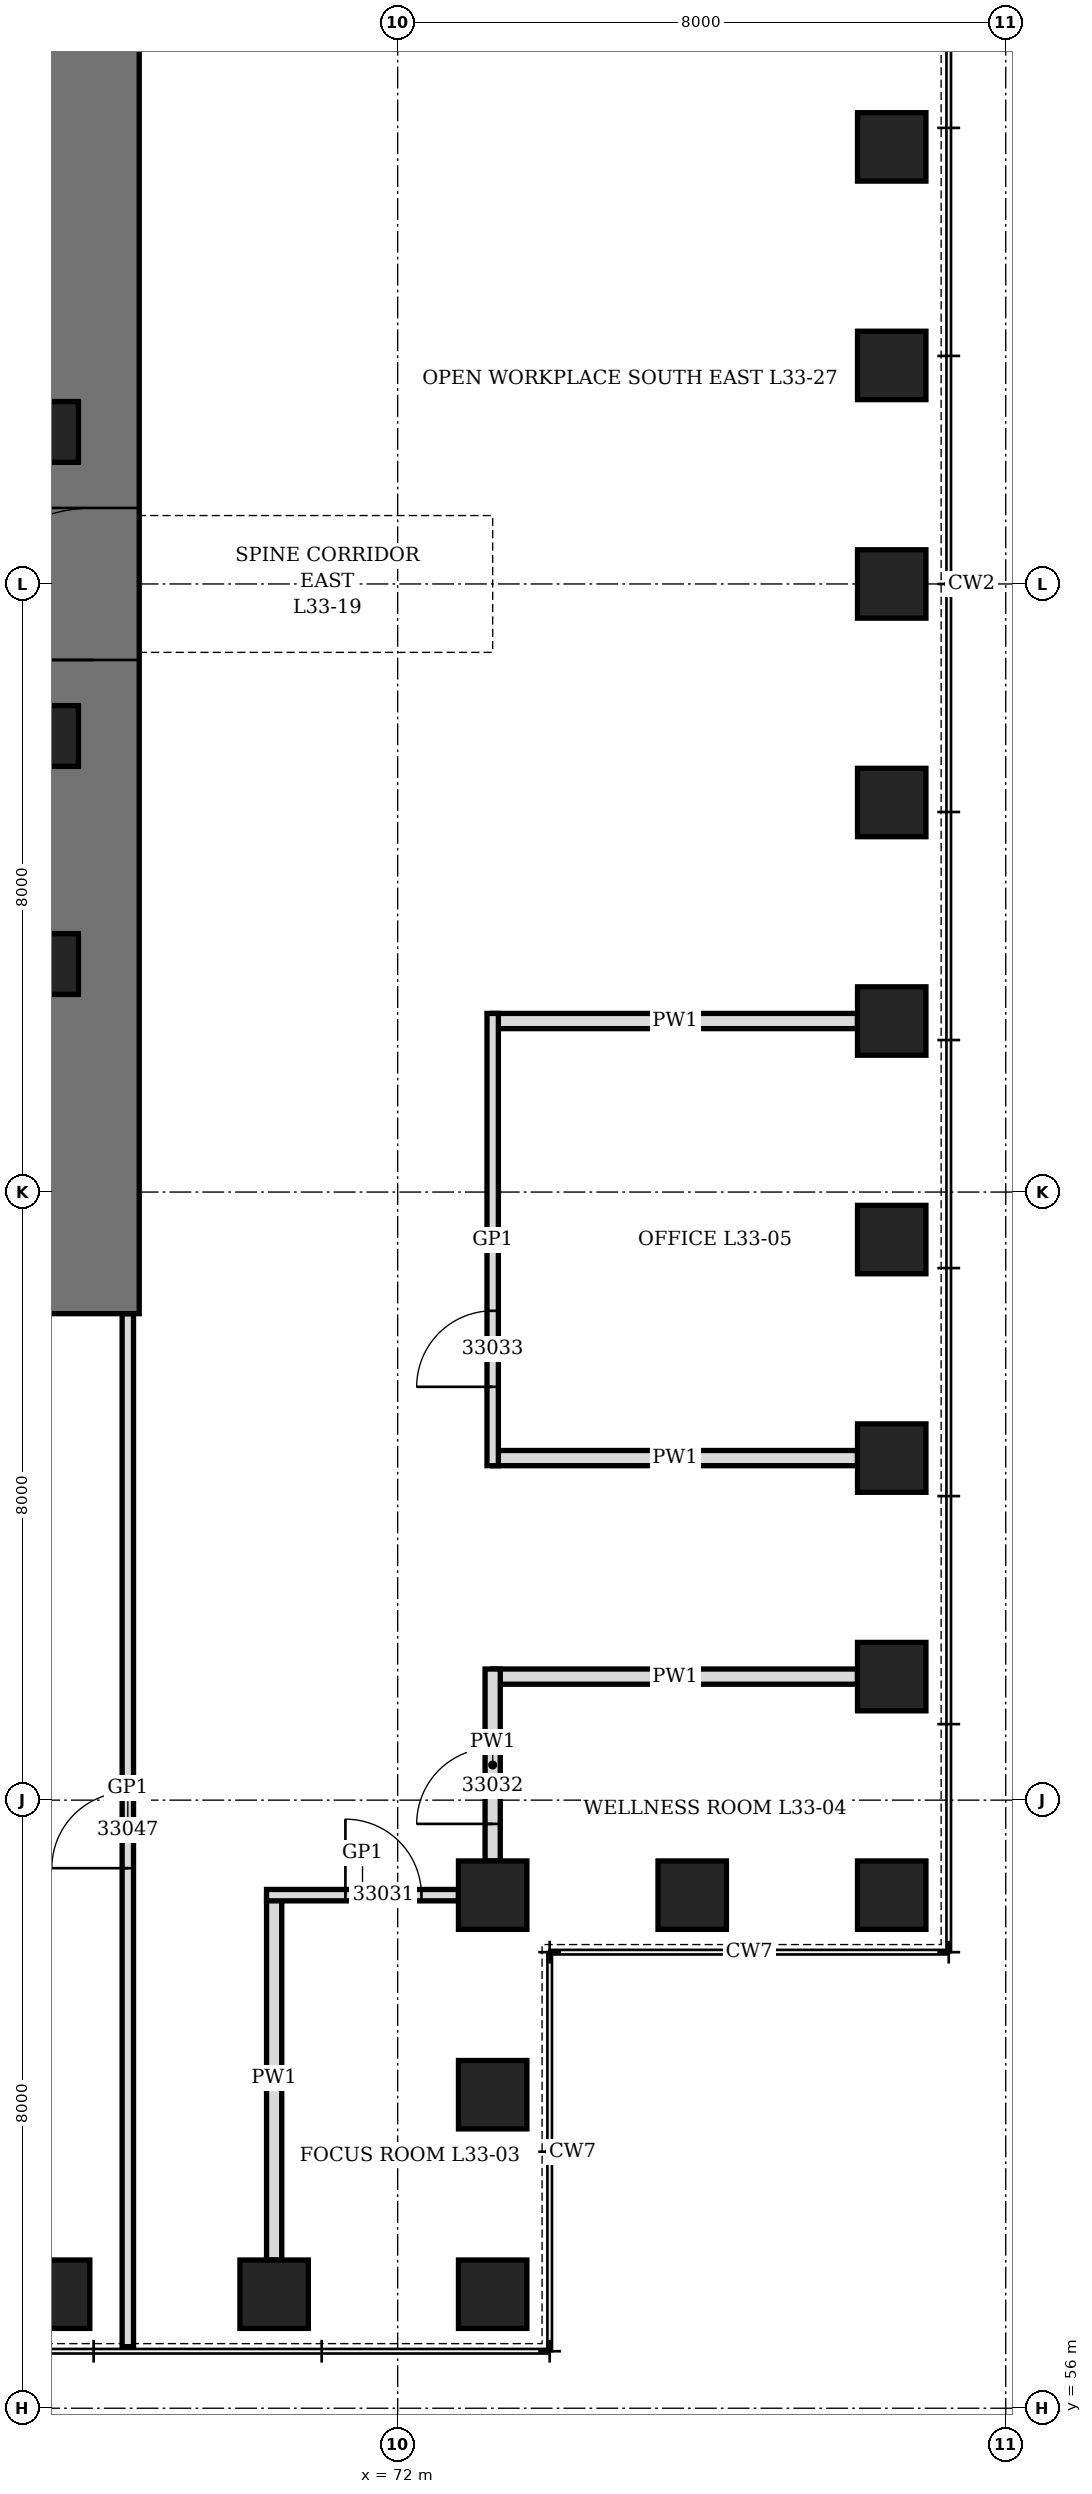
"""IFC4 building model, lengths in metres.
Left out: names, types, materials, properties, quantities, classifications, styles, units other than length and angle.
Written with IfcOpenShell. Run it as: python <this file> out.ifc"""

import sys

from ifc_helpers import new_model, si_unit, direction, frame, frame_2d, origin, origin_2d, place, context, subcontext, project, spatial, rectangle, hollow_rectangle, extrude, element, fill, save


model = new_model("IFC4")
c1 = context("Model", 3, precision=1e-05, world=origin(), true_north=direction((0.0, 1.0)))
c2 = subcontext(c1, "Body", "Model", "MODEL_VIEW")
j1 = project(units=[si_unit("LENGTHUNIT", "METRE"), si_unit("PLANEANGLEUNIT", "RADIAN")], contexts=[c1])
p1 = place(None, origin())
s1 = spatial("IfcSite", under=j1, at=p1, CompositionType="ELEMENT")
p2 = place(p1, origin())
s2 = spatial("IfcBuilding", under=s1, at=p2, CompositionType="ELEMENT")
p3 = place(p2, frame((0.0, 0.0, 150.1)))
s3 = spatial("IfcBuildingStorey", under=s2, at=p3, CompositionType="ELEMENT", Elevation=150.1)
for number, where, z_axis, x_axis in (
    (1, (67.5, 57.5, 0.0), (0.0, 0.0, 1.0), (1.0, 0.0, 0.0)),
    (2, (70.375, 57.5, 0.0), (0.0, 0.0, 1.0), (1.0, 0.0, 0.0)),
    (3, (73.25, 57.5, 0.0), (0.0, 0.0, 1.0), (0.0, 1.0, 0.0)),
    (4, (73.25, 60.125, 0.0), (0.0, 0.0, 1.0), (0.0, 1.0, 0.0)),
    (5, (73.25, 62.75, 0.0), (0.0, 0.0, 1.0), (1.0, 0.0, 0.0)),
    (6, (75.875, 62.75, 0.0), (0.0, 0.0, 1.0), (1.0, 0.0, 0.0)),
    (7, (78.5, 62.75, 0.0), (0.0, 0.0, 1.0), (0.0, 1.0, 0.0)),
    (8, (78.5, 65.625, 0.0), (0.0, 0.0, 1.0), (0.0, 1.0, 0.0)),
    (9, (78.5, 68.5, 0.0), (0.0, 0.0, 1.0), (0.0, 1.0, 0.0)),
    (10, (78.5, 71.375, 0.0), (0.0, 0.0, 1.0), (0.0, 1.0, 0.0)),
    (11, (78.5, 74.25, 0.0), (0.0, 0.0, 1.0), (0.0, 1.0, 0.0)),
    (12, (78.5, 77.125, 0.0), (0.0, 0.0, 1.0), (0.0, 1.0, 0.0)),
    (13, (78.5, 80.0, 0.0), (0.0, 0.0, 1.0), (0.0, 1.0, 0.0)),
    (14, (78.5, 82.875, 0.0), (0.0, 0.0, 1.0), (0.0, 1.0, 0.0)),
    (15, (78.5, 85.75, 0.0), (0.0, 0.0, 1.0), (0.0, 1.0, 0.0)),
):
    element("IfcColumn", number, at=place(p3, frame(where, z_axis=z_axis, x_axis=x_axis)), inside=s3, PredefinedType="COLUMN", context=c2, shape_type="SweptSolid", body=[
        extrude(hollow_rectangle(XDim=0.9, YDim=0.9, WallThickness=0.12, at=origin_2d()), origin(), (0.0, 0.0, 1.0), 4.2),
    ])
p4 = place(p3, frame((68.0, 70.4, 0.0), z_axis=(0.0, 0.0, 1.0), x_axis=(0.0, 1.0, 0.0)))
e16 = element("IfcWall", 16, at=p4, inside=s3, PredefinedType="SHEAR", context=c2, shape_type="SweptSolid", body=[
    extrude(rectangle(XDim=19.2, YDim=1.2, at=frame_2d((9.6, 0.0))), origin(), (0.0, 0.0, 1.0), 4.2),
])
p5 = place(p4, frame((8.6, 0.0, 0.0)))
e17 = element("IfcOpeningElement", 17, at=p5, cuts=e16, PredefinedType="OPENING", context=c2, shape_type="SweptSolid", body=[
    extrude(rectangle(XDim=2.0, YDim=2.4, at=frame_2d((1.0, 1.2))), frame((0.0, 0.61, 0.0), z_axis=(0.0, -1.0, 0.0), x_axis=(1.0, 0.0, 0.0)), (0.0, 0.0, 1.0), 1.22),
])
for number, where, z_axis, x_axis in (
    (18, (67.4, 75.0, 0.0), (0.0, 0.0, 1.0), (1.0, 0.0, 0.0)),
    (19, (67.4, 78.0, 0.0), (0.0, 0.0, 1.0), (1.0, 0.0, 0.0)),
    (20, (67.4, 82.0, 0.0), (0.0, 0.0, 1.0), (1.0, 0.0, 0.0)),
):
    element("IfcColumn", number, at=place(p3, frame(where, z_axis=z_axis, x_axis=x_axis)), inside=s3, PredefinedType="COLUMN", context=c2, shape_type="SweptSolid", body=[
        extrude(hollow_rectangle(XDim=0.8, YDim=0.8, WallThickness=0.1, at=origin_2d()), origin(), (0.0, 0.0, 1.0), 4.2),
    ])
for number, where, z_axis, x_axis in (
    (21, (70.375, 57.95, 0.0), (0.0, 0.0, 1.0), (0.0, 1.0, 0.0)),
    (22, (73.25, 65.625, 0.0), (0.0, 0.0, 1.0), (1.0, 0.0, 0.0)),
    (23, (73.25, 68.5, 0.0), (0.0, 0.0, 1.0), (1.0, 0.0, 0.0)),
    (24, (73.25, 74.25, 0.0), (0.0, 0.0, 1.0), (1.0, 0.0, 0.0)),
):
    element("IfcWall", number, at=place(p3, frame(where, z_axis=z_axis, x_axis=x_axis)), inside=s3, PredefinedType="PARTITIONING", context=c2, shape_type="SweptSolid", body=[
        extrude(rectangle(XDim=4.8, YDim=0.2, at=frame_2d((2.4, 0.0))), origin(), (0.0, 0.0, 1.0), 3.428),
    ])
p6 = place(p3, frame((70.275, 62.75, 0.0), z_axis=(0.0, 0.0, 1.0), x_axis=(1.0, 0.0, 0.0)))
e25 = element("IfcWall", 25, at=p6, inside=s3, PredefinedType="PARTITIONING", context=c2, shape_type="SweptSolid", body=[
    extrude(rectangle(XDim=2.525, YDim=0.15, at=frame_2d((1.263, 0.0))), origin(), (0.0, 0.0, 1.0), 4.04),
])
p7 = place(p6, frame((1.038, 0.0, 0.0)))
e26 = element("IfcOpeningElement", 26, at=p7, cuts=e25, PredefinedType="OPENING", context=c2, shape_type="SweptSolid", body=[
    extrude(rectangle(XDim=1.0, YDim=2.4, at=frame_2d((0.5, 1.2))), frame((0.0, 0.085, 0.0), z_axis=(0.0, -1.0, 0.0), x_axis=(1.0, 0.0, 0.0)), (0.0, 0.0, 1.0), 0.17),
])
p8 = place(p3, frame((68.45, 56.81, 0.0), z_axis=(0.0, 0.0, 1.0), x_axis=(0.0, 1.0, 0.0)))
e27 = element("IfcWall", 27, at=p8, inside=s3, PredefinedType="PARTITIONING", context=c2, shape_type="SweptSolid", body=[
    extrude(rectangle(XDim=13.59, YDim=0.15, at=frame_2d((6.795, 0.0))), origin(), (0.0, 0.0, 1.0), 4.04),
])
p9 = place(p8, frame((6.295, 0.0, 0.0)))
e28 = element("IfcOpeningElement", 28, at=p9, cuts=e27, PredefinedType="OPENING", context=c2, shape_type="SweptSolid", body=[
    extrude(rectangle(XDim=1.0, YDim=2.4, at=frame_2d((0.5, 1.2))), frame((0.0, 0.085, 0.0), z_axis=(0.0, -1.0, 0.0), x_axis=(1.0, 0.0, 0.0)), (0.0, 0.0, 1.0), 0.17),
])
p10 = place(p3, frame((73.25, 68.4, 0.0), z_axis=(0.0, 0.0, 1.0), x_axis=(0.0, 1.0, 0.0)))
e29 = element("IfcWall", 29, at=p10, inside=s3, PredefinedType="PARTITIONING", context=c2, shape_type="SweptSolid", body=[
    extrude(rectangle(XDim=5.95, YDim=0.15, at=frame_2d((2.975, 0.0))), origin(), (0.0, 0.0, 1.0), 4.04),
])
p11 = place(p10, frame((1.038, 0.0, 0.0)))
e30 = element("IfcOpeningElement", 30, at=p11, cuts=e29, PredefinedType="OPENING", context=c2, shape_type="SweptSolid", body=[
    extrude(rectangle(XDim=1.0, YDim=2.1, at=frame_2d((0.5, 1.05))), frame((0.0, 0.085, 0.0), z_axis=(0.0, -1.0, 0.0), x_axis=(1.0, 0.0, 0.0)), (0.0, 0.0, 1.0), 0.17),
])
p12 = place(p3, frame((73.25, 63.2, 0.0), z_axis=(0.0, 0.0, 1.0), x_axis=(0.0, 1.0, 0.0)))
e31 = element("IfcWall", 31, at=p12, inside=s3, PredefinedType="PARTITIONING", context=c2, shape_type="SweptSolid", body=[
    extrude(rectangle(XDim=2.525, YDim=0.2, at=frame_2d((1.263, 0.0))), origin(), (0.0, 0.0, 1.0), 4.04),
])
p13 = place(p12, frame((0.488, 0.0, 0.0)))
e32 = element("IfcOpeningElement", 32, at=p13, cuts=e31, PredefinedType="OPENING", context=c2, shape_type="SweptSolid", body=[
    extrude(rectangle(XDim=1.0, YDim=2.1, at=frame_2d((0.5, 1.05))), frame((0.0, 0.11, 0.0), z_axis=(0.0, -1.0, 0.0), x_axis=(1.0, 0.0, 0.0)), (0.0, 0.0, 1.0), 0.22),
])
p14 = place(p5, origin())
e33 = element("IfcDoor", 33, at=p14, inside=s3, OperationType="DOUBLE_DOOR_SINGLE_SWING", PredefinedType="DOOR", context=c2, shape_type="SweptSolid", body=[
    extrude(rectangle(XDim=2.0, YDim=2.4, at=frame_2d((1.0, 1.2))), frame((0.0, 0.35, 0.0), z_axis=(0.0, -1.0, 0.0), x_axis=(1.0, 0.0, 0.0)), (0.0, 0.0, 1.0), 0.7),
])
fill(e17, e33)
p15 = place(p7, origin())
e34 = element("IfcDoor", 34, at=p15, inside=s3, OperationType="SINGLE_SWING_RIGHT", PredefinedType="DOOR", context=c2, shape_type="SweptSolid", body=[
    extrude(rectangle(XDim=1.0, YDim=2.4, at=frame_2d((0.5, 1.2))), frame((0.0, 0.075, 0.0), z_axis=(0.0, -1.0, 0.0), x_axis=(1.0, 0.0, 0.0)), (0.0, 0.0, 1.0), 0.149),
])
fill(e26, e34)
p16 = place(p13, origin())
e35 = element("IfcDoor", 35, at=p16, inside=s3, OperationType="SINGLE_SWING_LEFT", PredefinedType="DOOR", context=c2, shape_type="SweptSolid", body=[
    extrude(rectangle(XDim=1.0, YDim=2.1, at=frame_2d((0.5, 1.05))), frame((0.0, 0.1, 0.0), z_axis=(0.0, -1.0, 0.0), x_axis=(1.0, 0.0, 0.0)), (0.0, 0.0, 1.0), 0.199),
])
fill(e32, e35)
p17 = place(p11, origin())
e36 = element("IfcDoor", 36, at=p17, inside=s3, OperationType="SINGLE_SWING_LEFT", PredefinedType="DOOR", context=c2, shape_type="SweptSolid", body=[
    extrude(rectangle(XDim=1.0, YDim=2.1, at=frame_2d((0.5, 1.05))), frame((0.0, 0.075, 0.0), z_axis=(0.0, -1.0, 0.0), x_axis=(1.0, 0.0, 0.0)), (0.0, 0.0, 1.0), 0.149),
])
fill(e30, e36)
p18 = place(p9, origin())
e37 = element("IfcDoor", 37, at=p18, inside=s3, OperationType="SINGLE_SWING_RIGHT", PredefinedType="DOOR", context=c2, shape_type="SweptSolid", body=[
    extrude(rectangle(XDim=1.0, YDim=2.4, at=frame_2d((0.5, 1.2))), frame((0.0, 0.075, 0.0), z_axis=(0.0, -1.0, 0.0), x_axis=(1.0, 0.0, 0.0)), (0.0, 0.0, 1.0), 0.149),
])
fill(e28, e37)
save(model, sys.argv[1])
